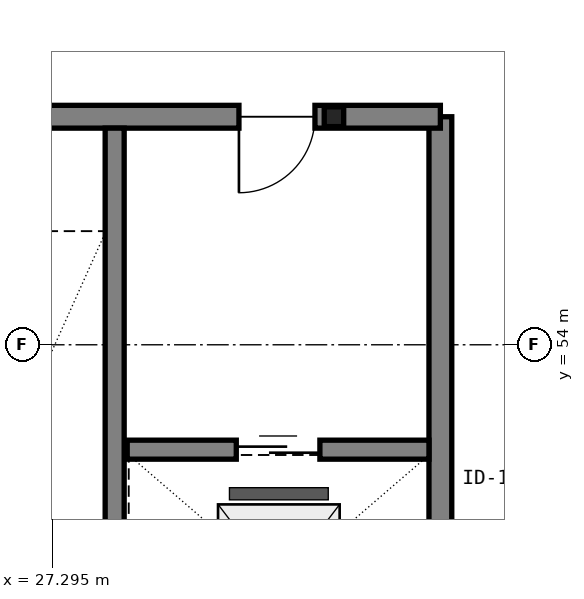
"""IFC4 building model, lengths in metres.
Left out: names, types, materials, properties, quantities, classifications, styles, units other than length and angle.
Written with IfcOpenShell. Run it as: python <this file> out.ifc"""

import sys

from ifc_helpers import new_model, si_unit, direction, frame, frame_2d, origin, origin_2d_with_axis, place, context, subcontext, project, spatial, rectangle, i_section, extrude, element, fill, save


model = new_model("IFC4")
c1 = context("Model", 3, precision=1e-05, world=origin(), true_north=direction((0.0, 1.0)))
c2 = subcontext(c1, "Body", "Model", "MODEL_VIEW")
j1 = project(units=[si_unit("LENGTHUNIT", "METRE"), si_unit("PLANEANGLEUNIT", "RADIAN")], contexts=[c1])
p1 = place(None, origin())
s1 = spatial("IfcSite", under=j1, at=p1, CompositionType="ELEMENT")
p2 = place(p1, origin())
s2 = spatial("IfcBuilding", under=s1, at=p2, CompositionType="ELEMENT")
p3 = place(p2, frame((0.0, 0.0, 4.5)))
s3 = spatial("IfcBuildingStorey", under=s2, at=p3, CompositionType="ELEMENT", Elevation=4.5)
p4 = place(p3, frame((31.0, 57.0, 0.0), z_axis=(0.0, 0.0, 1.0), x_axis=(1.0, 0.0, 0.0)))
e1 = element("IfcColumn", 1, at=p4, inside=s3, PredefinedType="COLUMN", context=c2, shape_type="SweptSolid", body=[
    extrude(i_section(OverallWidth=0.256, OverallDepth=0.26, WebThickness=0.01, FlangeThickness=0.017, FilletRadius=0.014, at=origin_2d_with_axis()), origin(), (0.0, 0.0, 1.0), 3.9),
])
p5 = place(p3, frame((32.4, 49.0, 0.0), z_axis=(0.0, 0.0, 1.0), x_axis=(0.0, 1.0, 0.0)))
e2 = element("IfcWall", 2, at=p5, inside=s3, PredefinedType="SHEAR", context=c2, shape_type="SweptSolid", body=[
    extrude(rectangle(XDim=8.0, YDim=0.3, at=frame_2d((4.0, 0.0), x_axis=(1.0, 0.0))), origin(), (0.0, 0.0, 1.0), 3.65),
])
p6 = place(p3, frame((32.4, 57.0, 0.0), z_axis=(0.0, 0.0, 1.0), x_axis=(-1.0, 0.0, 0.0)))
e3 = element("IfcWall", 3, at=p6, inside=s3, PredefinedType="SHEAR", context=c2, shape_type="SweptSolid", body=[
    extrude(rectangle(XDim=7.4, YDim=0.3, at=frame_2d((3.7, 0.0), x_axis=(1.0, 0.0))), origin(), (0.0, 0.0, 1.0), 3.65),
])
p7 = place(p6, frame((1.65, 0.0, 0.0)))
e4 = element("IfcOpeningElement", 4, at=p7, cuts=e3, PredefinedType="OPENING", context=c2, shape_type="SweptSolid", body=[
    extrude(rectangle(XDim=1.0, YDim=2.15, at=frame_2d((0.5, 1.075), x_axis=(1.0, 0.0))), frame((0.0, 0.16, 0.0), z_axis=(0.0, -1.0, 0.0), x_axis=(1.0, 0.0, 0.0)), (0.0, 0.0, 1.0), 0.32),
])
p8 = place(p6, frame((5.3, 0.0, 0.0)))
e5 = element("IfcOpeningElement", 5, at=p8, cuts=e3, PredefinedType="OPENING", context=c2, shape_type="SweptSolid", body=[
    extrude(rectangle(XDim=1.0, YDim=2.15, at=frame_2d((0.5, 1.075), x_axis=(1.0, 0.0))), frame((0.0, 0.16, 0.0), z_axis=(0.0, -1.0, 0.0), x_axis=(1.0, 0.0, 0.0)), (0.0, 0.0, 1.0), 0.32),
])
p9 = place(p3, frame((28.115, 49.15, 0.0), z_axis=(0.0, 0.0, 1.0), x_axis=(0.0, 1.0, 0.0)))
e6 = element("IfcWall", 6, at=p9, inside=s3, PredefinedType="SHEAR", context=c2, shape_type="SweptSolid", body=[
    extrude(rectangle(XDim=7.7, YDim=0.25, at=frame_2d((3.85, 0.0), x_axis=(1.0, 0.0))), origin(), (0.0, 0.0, 1.0), 3.65),
])
p10 = place(p3, frame((28.28, 52.62, 0.0), z_axis=(0.0, 0.0, 1.0), x_axis=(1.0, 0.0, 0.0)))
e7 = element("IfcWall", 7, at=p10, inside=s3, PredefinedType="SHEAR", context=c2, shape_type="SweptSolid", body=[
    extrude(rectangle(XDim=3.97, YDim=0.25, at=frame_2d((1.985, 0.0), x_axis=(1.0, 0.0))), origin(), (0.0, 0.0, 1.0), 3.65),
])
p11 = place(p10, frame((1.435, 0.0, 0.0)))
e8 = element("IfcOpeningElement", 8, at=p11, cuts=e7, PredefinedType="OPENING", context=c2, shape_type="SweptSolid", body=[
    extrude(rectangle(XDim=1.1, YDim=2.15, at=frame_2d((0.55, 1.075), x_axis=(1.0, 0.0))), frame((0.0, 0.135, 0.0), z_axis=(0.0, -1.0, 0.0), x_axis=(1.0, 0.0, 0.0)), (0.0, 0.0, 1.0), 0.27),
])
p12 = place(p7, origin())
e9 = element("IfcDoor", 9, at=p12, inside=s3, OperationType="SINGLE_SWING_RIGHT", PredefinedType="DOOR", context=c2, shape_type="SweptSolid", body=[
    extrude(rectangle(XDim=1.0, YDim=2.15, at=frame_2d((0.5, 1.075), x_axis=(1.0, 0.0))), frame((0.0, 0.025, 0.0), z_axis=(0.0, -1.0, 0.0), x_axis=(1.0, 0.0, 0.0)), (0.0, 0.0, 1.0), 0.05),
])
fill(e4, e9)
p13 = place(p11, origin())
e10 = element("IfcDoor", 10, at=p13, inside=s3, OperationType="SLIDING_TO_LEFT", PredefinedType="DOOR", context=c2, shape_type="SweptSolid", body=[
    extrude(rectangle(XDim=1.1, YDim=2.15, at=frame_2d((0.55, 1.075), x_axis=(1.0, 0.0))), frame((0.0, 0.025, 0.0), z_axis=(0.0, -1.0, 0.0), x_axis=(1.0, 0.0, 0.0)), (0.0, 0.0, 1.0), 0.05),
])
fill(e8, e10)
save(model, sys.argv[1])
